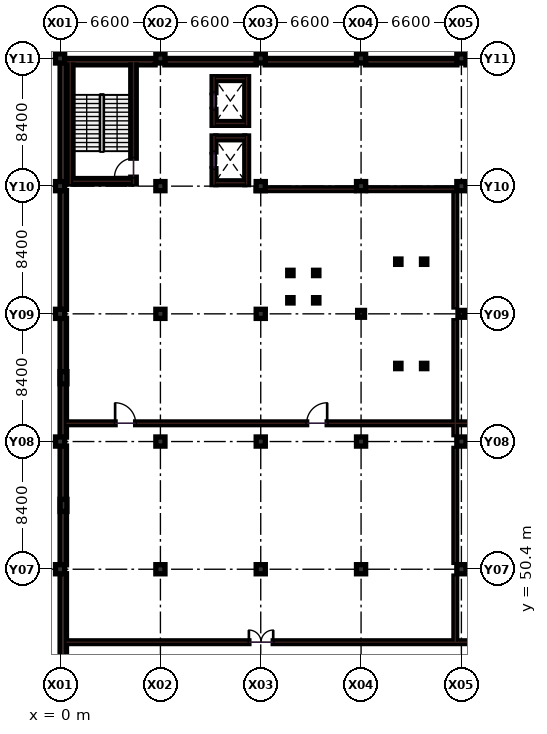
"""IFC4 building model, lengths in metres.
Left out: names, types, materials, properties, quantities, classifications, styles, units other than length and angle.
Written with IfcOpenShell. Run it as: python <this file> out.ifc"""

import sys

from ifc_helpers import new_model, si_unit, direction, frame, frame_2d, origin, origin_2d, place, context, subcontext, project, spatial, rectangle, extrude, element, fill, save


model = new_model("IFC4")
c1 = context("Model", 3, precision=1e-05, world=origin(), true_north=direction((0.0, 1.0)))
c2 = subcontext(c1, "Body", "Model", "MODEL_VIEW")
j1 = project(units=[si_unit("LENGTHUNIT", "METRE"), si_unit("PLANEANGLEUNIT", "RADIAN")], contexts=[c1])
p1 = place(None, origin())
s1 = spatial("IfcSite", under=j1, at=p1, CompositionType="ELEMENT")
p2 = place(p1, origin())
s2 = spatial("IfcBuilding", under=s1, at=p2, CompositionType="ELEMENT")
p3 = place(p2, frame((0.0, 0.0, -4.5)))
s3 = spatial("IfcBuildingStorey", under=s2, at=p3, CompositionType="ELEMENT", Elevation=-4.5)
for number, where, z_axis, x_axis in (
    (1, (0.0, 50.4, 0.0), (0.0, 0.0, 1.0), (1.0, 0.0, 0.0)),
    (2, (0.0, 58.8, 0.0), (0.0, 0.0, 1.0), (1.0, 0.0, 0.0)),
    (3, (0.0, 67.2, 0.0), (0.0, 0.0, 1.0), (1.0, 0.0, 0.0)),
    (4, (0.0, 75.6, 0.0), (0.0, 0.0, 1.0), (1.0, 0.0, 0.0)),
    (5, (0.0, 84.0, 0.0), (0.0, 0.0, 1.0), (1.0, 0.0, 0.0)),
    (6, (6.6, 50.4, 0.0), (0.0, 0.0, 1.0), (1.0, 0.0, 0.0)),
    (7, (6.6, 58.8, 0.0), (0.0, 0.0, 1.0), (1.0, 0.0, 0.0)),
    (8, (6.6, 67.2, 0.0), (0.0, 0.0, 1.0), (1.0, 0.0, 0.0)),
    (9, (6.6, 75.6, 0.0), (0.0, 0.0, 1.0), (1.0, 0.0, 0.0)),
    (10, (6.6, 84.0, 0.0), (0.0, 0.0, 1.0), (1.0, 0.0, 0.0)),
    (11, (13.2, 50.4, 0.0), (0.0, 0.0, 1.0), (1.0, 0.0, 0.0)),
    (12, (13.2, 58.8, 0.0), (0.0, 0.0, 1.0), (1.0, 0.0, 0.0)),
    (13, (13.2, 67.2, 0.0), (0.0, 0.0, 1.0), (1.0, 0.0, 0.0)),
    (14, (13.2, 75.6, 0.0), (0.0, 0.0, 1.0), (1.0, 0.0, 0.0)),
    (15, (13.2, 84.0, 0.0), (0.0, 0.0, 1.0), (1.0, 0.0, 0.0)),
    (16, (19.8, 50.4, 0.0), (0.0, 0.0, 1.0), (1.0, 0.0, 0.0)),
    (17, (19.8, 58.8, 0.0), (0.0, 0.0, 1.0), (1.0, 0.0, 0.0)),
):
    element("IfcColumn", number, at=place(p3, frame(where, z_axis=z_axis, x_axis=x_axis)), inside=s3, PredefinedType="COLUMN", context=c2, shape_type="SweptSolid", body=[
        extrude(rectangle(XDim=0.6, YDim=0.6, at=origin_2d()), origin(), (0.0, 0.0, 1.0), 4.5),
    ])
p4 = place(p3, frame((19.8, 67.2, 0.0), z_axis=(0.0, 0.0, 1.0), x_axis=(1.0, 0.0, 0.0)))
e18 = element("IfcColumn", 18, at=p4, inside=s3, PredefinedType="COLUMN", context=c2, shape_type="SweptSolid", body=[
    extrude(rectangle(XDim=0.45, YDim=0.45, at=origin_2d()), origin(), (0.0, 0.0, 1.0), 4.5),
])
for number, where, z_axis, x_axis in (
    (19, (19.8, 75.6, 0.0), (0.0, 0.0, 1.0), (1.0, 0.0, 0.0)),
    (20, (19.8, 84.0, 0.0), (0.0, 0.0, 1.0), (1.0, 0.0, 0.0)),
    (21, (26.4, 50.4, 0.0), (0.0, 0.0, 1.0), (1.0, 0.0, 0.0)),
    (22, (26.4, 58.8, 0.0), (0.0, 0.0, 1.0), (1.0, 0.0, 0.0)),
):
    element("IfcColumn", number, at=place(p3, frame(where, z_axis=z_axis, x_axis=x_axis)), inside=s3, PredefinedType="COLUMN", context=c2, shape_type="SweptSolid", body=[
        extrude(rectangle(XDim=0.6, YDim=0.6, at=origin_2d()), origin(), (0.0, 0.0, 1.0), 4.5),
    ])
p5 = place(p3, frame((26.4, 67.2, 0.0), z_axis=(0.0, 0.0, 1.0), x_axis=(1.0, 0.0, 0.0)))
e23 = element("IfcColumn", 23, at=p5, inside=s3, PredefinedType="COLUMN", context=c2, shape_type="SweptSolid", body=[
    extrude(rectangle(XDim=0.45, YDim=0.45, at=origin_2d()), origin(), (0.0, 0.0, 1.0), 4.5),
])
for number, where, z_axis, x_axis in (
    (24, (26.4, 75.6, 0.0), (0.0, 0.0, 1.0), (1.0, 0.0, 0.0)),
    (25, (26.4, 84.0, 0.0), (0.0, 0.0, 1.0), (1.0, 0.0, 0.0)),
):
    element("IfcColumn", number, at=place(p3, frame(where, z_axis=z_axis, x_axis=x_axis)), inside=s3, PredefinedType="COLUMN", context=c2, shape_type="SweptSolid", body=[
        extrude(rectangle(XDim=0.6, YDim=0.6, at=origin_2d()), origin(), (0.0, 0.0, 1.0), 4.5),
    ])
for number, where, z_axis, x_axis in (
    (26, (0.225, 54.6, 0.0), (0.0, 0.0, 1.0), (1.0, 0.0, 0.0)),
    (27, (0.225, 63.0, 0.0), (0.0, 0.0, 1.0), (1.0, 0.0, 0.0)),
):
    element("IfcColumn", number, at=place(p3, frame(where, z_axis=z_axis, x_axis=x_axis)), inside=s3, PredefinedType="PILASTER", context=c2, shape_type="SweptSolid", body=[
        extrude(rectangle(XDim=0.45, YDim=0.8, at=origin_2d()), origin(), (0.0, 0.0, 1.0), 4.5),
    ])
p6 = place(p3, frame((0.42, 45.6, 0.0), z_axis=(0.0, 0.0, 1.0), x_axis=(1.0, 0.0, 0.0)))
e28 = element("IfcWall", 28, at=p6, inside=s3, PredefinedType="SOLIDWALL", context=c2, shape_type="SweptSolid", body=[
    extrude(rectangle(XDim=45.36, YDim=0.18, at=frame_2d((22.68, 0.0))), origin(), (0.0, 0.0, 1.0), 3.29),
])
p7 = place(p6, frame((12.0, 0.0, 0.0)))
e29 = element("IfcOpeningElement", 29, at=p7, cuts=e28, PredefinedType="OPENING", context=c2, shape_type="SweptSolid", body=[
    extrude(rectangle(XDim=1.6, YDim=2.2, at=frame_2d((0.8, 1.1))), frame((0.0, 0.1, 0.0), z_axis=(0.0, -1.0, 0.0), x_axis=(1.0, 0.0, 0.0)), (0.0, 0.0, 1.0), 0.2),
])
p8 = place(p6, frame((34.0, 0.0, 0.0)))
e30 = element("IfcOpeningElement", 30, at=p8, cuts=e28, PredefinedType="OPENING", context=c2, shape_type="SweptSolid", body=[
    extrude(rectangle(XDim=1.6, YDim=2.2, at=frame_2d((0.8, 1.1))), frame((0.0, 0.1, 0.0), z_axis=(0.0, -1.0, 0.0), x_axis=(1.0, 0.0, 0.0)), (0.0, 0.0, 1.0), 0.2),
])
p9 = place(p3, frame((26.0, 45.6, 0.0), z_axis=(0.0, 0.0, 1.0), x_axis=(0.0, 1.0, 0.0)))
e31 = element("IfcWall", 31, at=p9, inside=s3, PredefinedType="SOLIDWALL", context=c2, shape_type="SweptSolid", body=[
    extrude(rectangle(XDim=4.35, YDim=0.18, at=frame_2d((2.175, 0.0))), origin(), (0.0, 0.0, 1.0), 3.29),
])
for number, where, z_axis, x_axis in (
    (32, (26.0, 50.85, 0.0), (0.0, 0.0, 1.0), (0.0, 1.0, 0.0)),
    (33, (26.0, 59.25, 0.0), (0.0, 0.0, 1.0), (0.0, 1.0, 0.0)),
):
    element("IfcWall", number, at=place(p3, frame(where, z_axis=z_axis, x_axis=x_axis)), inside=s3, PredefinedType="SOLIDWALL", context=c2, shape_type="SweptSolid", body=[
        extrude(rectangle(XDim=7.5, YDim=0.18, at=frame_2d((3.75, 0.0))), origin(), (0.0, 0.0, 1.0), 3.29),
    ])
p10 = place(p3, frame((26.0, 67.65, 0.0), z_axis=(0.0, 0.0, 1.0), x_axis=(0.0, 1.0, 0.0)))
e34 = element("IfcWall", 34, at=p10, inside=s3, PredefinedType="SOLIDWALL", context=c2, shape_type="SweptSolid", body=[
    extrude(rectangle(XDim=7.75, YDim=0.18, at=frame_2d((3.875, 0.0))), origin(), (0.0, 0.0, 1.0), 3.29),
])
p11 = place(p3, frame((12.9, 75.4, 0.0), z_axis=(0.0, 0.0, 1.0), x_axis=(1.0, 0.0, 0.0)))
e35 = element("IfcWall", 35, at=p11, inside=s3, PredefinedType="SOLIDWALL", context=c2, shape_type="SweptSolid", body=[
    extrude(rectangle(XDim=6.45, YDim=0.18, at=frame_2d((3.225, 0.0))), origin(), (0.0, 0.0, 1.0), 3.275),
])
p12 = place(p3, frame((20.25, 75.4, 0.0), z_axis=(0.0, 0.0, 1.0), x_axis=(1.0, 0.0, 0.0)))
e36 = element("IfcWall", 36, at=p12, inside=s3, PredefinedType="SOLIDWALL", context=c2, shape_type="SweptSolid", body=[
    extrude(rectangle(XDim=5.7, YDim=0.18, at=frame_2d((2.85, 0.0))), origin(), (0.0, 0.0, 1.0), 3.275),
])
p13 = place(p3, frame((0.42, 60.0, 0.0), z_axis=(0.0, 0.0, 1.0), x_axis=(1.0, 0.0, 0.0)))
e37 = element("IfcWall", 37, at=p13, inside=s3, PredefinedType="SOLIDWALL", context=c2, shape_type="SweptSolid", body=[
    extrude(rectangle(XDim=25.58, YDim=0.18, at=frame_2d((12.79, 0.0))), origin(), (0.0, 0.0, 1.0), 3.29),
])
p14 = place(p13, frame((3.2, 0.0, 0.0)))
e38 = element("IfcOpeningElement", 38, at=p14, cuts=e37, PredefinedType="OPENING", context=c2, shape_type="SweptSolid", body=[
    extrude(rectangle(XDim=1.35, YDim=2.2, at=frame_2d((0.675, 1.1))), frame((0.0, 0.1, 0.0), z_axis=(0.0, -1.0, 0.0), x_axis=(1.0, 0.0, 0.0)), (0.0, 0.0, 1.0), 0.2),
])
p15 = place(p13, frame((15.8, 0.0, 0.0)))
e39 = element("IfcOpeningElement", 39, at=p15, cuts=e37, PredefinedType="OPENING", context=c2, shape_type="SweptSolid", body=[
    extrude(rectangle(XDim=1.35, YDim=2.2, at=frame_2d((0.675, 1.1))), frame((0.0, 0.1, 0.0), z_axis=(0.0, -1.0, 0.0), x_axis=(1.0, 0.0, 0.0)), (0.0, 0.0, 1.0), 0.2),
])
p16 = place(p3, frame((26.0, 60.0, 0.0), z_axis=(0.0, 0.0, 1.0), x_axis=(1.0, 0.0, 0.0)))
e40 = element("IfcWall", 40, at=p16, inside=s3, PredefinedType="SOLIDWALL", context=c2, shape_type="SweptSolid", body=[
    extrude(rectangle(XDim=19.85, YDim=0.18, at=frame_2d((9.925, 0.0))), origin(), (0.0, 0.0, 1.0), 3.29),
])
p17 = place(p16, frame((3.2, 0.0, 0.0)))
e41 = element("IfcOpeningElement", 41, at=p17, cuts=e40, PredefinedType="OPENING", context=c2, shape_type="SweptSolid", body=[
    extrude(rectangle(XDim=1.75, YDim=2.3, at=frame_2d((0.875, 1.15))), frame((0.0, 0.1, 0.0), z_axis=(0.0, -1.0, 0.0), x_axis=(1.0, 0.0, 0.0)), (0.0, 0.0, 1.0), 0.2),
])
p18 = place(p16, frame((10.2, 0.0, 0.0)))
e42 = element("IfcOpeningElement", 42, at=p18, cuts=e40, PredefinedType="OPENING", context=c2, shape_type="SweptSolid", body=[
    extrude(rectangle(XDim=1.75, YDim=2.3, at=frame_2d((0.875, 1.15))), frame((0.0, 0.1, 0.0), z_axis=(0.0, -1.0, 0.0), x_axis=(1.0, 0.0, 0.0)), (0.0, 0.0, 1.0), 0.2),
])
p19 = place(p3, frame((0.21, 50.105, 0.0), z_axis=(0.0, 0.0, 1.0), x_axis=(0.0, -1.0, 0.0)))
e43 = element("IfcWall", 43, at=p19, inside=s3, PredefinedType="SOLIDWALL", context=c2, shape_type="SweptSolid", body=[
    extrude(rectangle(XDim=7.81, YDim=0.42, at=frame_2d((3.905, 0.0))), origin(), (0.0, 0.0, 1.0), 4.14),
])
p20 = place(p3, frame((0.21, 58.505, 0.0), z_axis=(0.0, 0.0, 1.0), x_axis=(0.0, -1.0, 0.0)))
e44 = element("IfcWall", 44, at=p20, inside=s3, PredefinedType="SOLIDWALL", context=c2, shape_type="SweptSolid", body=[
    extrude(rectangle(XDim=7.81, YDim=0.42, at=frame_2d((3.905, 0.0))), origin(), (0.0, 0.0, 1.0), 4.14),
])
p21 = place(p3, frame((0.21, 66.905, 0.0), z_axis=(0.0, 0.0, 1.0), x_axis=(0.0, -1.0, 0.0)))
e45 = element("IfcWall", 45, at=p21, inside=s3, PredefinedType="SOLIDWALL", context=c2, shape_type="SweptSolid", body=[
    extrude(rectangle(XDim=7.81, YDim=0.42, at=frame_2d((3.905, 0.0))), origin(), (0.0, 0.0, 1.0), 4.14),
])
p22 = place(p3, frame((0.21, 75.305, 0.0), z_axis=(0.0, 0.0, 1.0), x_axis=(0.0, -1.0, 0.0)))
e46 = element("IfcWall", 46, at=p22, inside=s3, PredefinedType="SOLIDWALL", context=c2, shape_type="SweptSolid", body=[
    extrude(rectangle(XDim=7.81, YDim=0.42, at=frame_2d((3.905, 0.0))), origin(), (0.0, 0.0, 1.0), 4.14),
])
p23 = place(p3, frame((6.25, 83.79, 0.0), z_axis=(0.0, 0.0, 1.0), x_axis=(-1.0, 0.0, 0.0)))
e47 = element("IfcWall", 47, at=p23, inside=s3, PredefinedType="SOLIDWALL", context=c2, shape_type="SweptSolid", body=[
    extrude(rectangle(XDim=5.9, YDim=0.42, at=frame_2d((2.95, 0.0))), origin(), (0.0, 0.0, 1.0), 4.14),
])
p24 = place(p3, frame((0.21, 83.705, 0.0), z_axis=(0.0, 0.0, 1.0), x_axis=(0.0, -1.0, 0.0)))
e48 = element("IfcWall", 48, at=p24, inside=s3, PredefinedType="SOLIDWALL", context=c2, shape_type="SweptSolid", body=[
    extrude(rectangle(XDim=7.81, YDim=0.42, at=frame_2d((3.905, 0.0))), origin(), (0.0, 0.0, 1.0), 4.14),
])
p25 = place(p3, frame((12.905, 83.79, 0.0), z_axis=(0.0, 0.0, 1.0), x_axis=(-1.0, 0.0, 0.0)))
e49 = element("IfcWall", 49, at=p25, inside=s3, PredefinedType="SOLIDWALL", context=c2, shape_type="SweptSolid", body=[
    extrude(rectangle(XDim=6.01, YDim=0.42, at=frame_2d((3.005, 0.0))), origin(), (0.0, 0.0, 1.0), 4.14),
])
p26 = place(p3, frame((19.505, 83.79, 0.0), z_axis=(0.0, 0.0, 1.0), x_axis=(-1.0, 0.0, 0.0)))
e50 = element("IfcWall", 50, at=p26, inside=s3, PredefinedType="SOLIDWALL", context=c2, shape_type="SweptSolid", body=[
    extrude(rectangle(XDim=6.01, YDim=0.42, at=frame_2d((3.005, 0.0))), origin(), (0.0, 0.0, 1.0), 4.14),
])
for number, where, z_axis, x_axis in (
    (51, (26.105, 83.79, 0.0), (0.0, 0.0, 1.0), (-1.0, 0.0, 0.0)),
    (52, (32.705, 83.79, 0.0), (0.0, 0.0, 1.0), (-1.0, 0.0, 0.0)),
):
    element("IfcWall", number, at=place(p3, frame(where, z_axis=z_axis, x_axis=x_axis)), inside=s3, PredefinedType="SOLIDWALL", context=c2, shape_type="SweptSolid", body=[
        extrude(rectangle(XDim=6.01, YDim=0.42, at=frame_2d((3.005, 0.0))), origin(), (0.0, 0.0, 1.0), 4.14),
    ])
p27 = place(p3, frame((0.67, 75.74, 0.0), z_axis=(0.0, 0.0, 1.0), x_axis=(0.0, 1.0, 0.0)))
e53 = element("IfcWall", 53, at=p27, inside=s3, PredefinedType="SHEAR", context=c2, shape_type="SweptSolid", body=[
    extrude(rectangle(XDim=8.05, YDim=0.36, at=frame_2d((4.025, 0.0))), origin(), (0.0, 0.0, 1.0), 4.14),
])
p28 = place(p3, frame((4.83, 75.74, 0.0), z_axis=(0.0, 0.0, 1.0), x_axis=(0.0, 1.0, 0.0)))
e54 = element("IfcWall", 54, at=p28, inside=s3, PredefinedType="SHEAR", context=c2, shape_type="SweptSolid", body=[
    extrude(rectangle(XDim=8.05, YDim=0.36, at=frame_2d((4.025, 0.0))), origin(), (0.0, 0.0, 1.0), 4.14),
])
p29 = place(p28, frame((0.45, 0.0, 0.0)))
e55 = element("IfcOpeningElement", 55, at=p29, cuts=e54, PredefinedType="OPENING", context=c2, shape_type="SweptSolid", body=[
    extrude(rectangle(XDim=1.25, YDim=2.15, at=frame_2d((0.625, 1.075))), frame((0.0, 0.19, 0.0), z_axis=(0.0, -1.0, 0.0), x_axis=(1.0, 0.0, 0.0)), (0.0, 0.0, 1.0), 0.38),
])
p30 = place(p3, frame((0.85, 75.92, 0.0), z_axis=(0.0, 0.0, 1.0), x_axis=(1.0, 0.0, 0.0)))
e56 = element("IfcWall", 56, at=p30, inside=s3, PredefinedType="SHEAR", context=c2, shape_type="SweptSolid", body=[
    extrude(rectangle(XDim=3.8, YDim=0.36, at=frame_2d((1.9, 0.0))), origin(), (0.0, 0.0, 1.0), 4.14),
])
for number, where, z_axis, x_axis in (
    (57, (15.15, 68.09, 0.0), (0.0, 0.0, 1.0), (1.0, 0.0, 0.0)),
    (58, (16.85, 68.09, 0.0), (0.0, 0.0, 1.0), (1.0, 0.0, 0.0)),
    (59, (16.85, 69.89, 0.0), (0.0, 0.0, 1.0), (1.0, 0.0, 0.0)),
    (60, (15.15, 69.89, 0.0), (0.0, 0.0, 1.0), (1.0, 0.0, 0.0)),
    (61, (22.25, 63.77, 0.0), (0.0, 0.0, 1.0), (1.0, 0.0, 0.0)),
    (62, (23.95, 63.77, 0.0), (0.0, 0.0, 1.0), (1.0, 0.0, 0.0)),
    (63, (23.95, 70.63, 0.0), (0.0, 0.0, 1.0), (1.0, 0.0, 0.0)),
    (64, (22.25, 70.63, 0.0), (0.0, 0.0, 1.0), (1.0, 0.0, 0.0)),
):
    element("IfcColumn", number, at=place(p3, frame(where, z_axis=z_axis, x_axis=x_axis)), inside=s3, PredefinedType="COLUMN", context=c2, shape_type="SweptSolid", body=[
        extrude(rectangle(XDim=0.35, YDim=0.35, at=origin_2d()), origin(), (0.0, 0.0, 1.0), 4.5),
    ])
p31 = place(p3, frame((10.125, 75.7, 0.0), z_axis=(0.0, 0.0, 1.0), x_axis=(0.0, 1.0, 0.0)))
e65 = element("IfcWall", 65, at=p31, inside=s3, PredefinedType="SHEAR", context=c2, shape_type="SweptSolid", body=[
    extrude(rectangle(XDim=3.2, YDim=0.25, at=frame_2d((1.6, 0.0))), origin(), (0.0, 0.0, 1.0), 4.14),
])
p32 = place(p31, frame((1.05, 0.0, 0.0)))
e66 = element("IfcOpeningElement", 66, at=p32, cuts=e65, PredefinedType="OPENING", context=c2, shape_type="SweptSolid", body=[
    extrude(rectangle(XDim=1.1, YDim=2.15, at=frame_2d((0.55, 1.075))), frame((0.0, 0.135, 0.0), z_axis=(0.0, -1.0, 0.0), x_axis=(1.0, 0.0, 0.0)), (0.0, 0.0, 1.0), 0.27),
])
p33 = place(p3, frame((12.275, 75.7, 0.0), z_axis=(0.0, 0.0, 1.0), x_axis=(0.0, 1.0, 0.0)))
e67 = element("IfcWall", 67, at=p33, inside=s3, PredefinedType="SHEAR", context=c2, shape_type="SweptSolid", body=[
    extrude(rectangle(XDim=3.2, YDim=0.25, at=frame_2d((1.6, 0.0))), origin(), (0.0, 0.0, 1.0), 4.14),
])
for number, where, z_axis, x_axis in (
    (68, (10.25, 75.825, 0.0), (0.0, 0.0, 1.0), (1.0, 0.0, 0.0)),
    (69, (10.25, 78.775, 0.0), (0.0, 0.0, 1.0), (1.0, 0.0, 0.0)),
):
    element("IfcWall", number, at=place(p3, frame(where, z_axis=z_axis, x_axis=x_axis)), inside=s3, PredefinedType="SHEAR", context=c2, shape_type="SweptSolid", body=[
        extrude(rectangle(XDim=1.9, YDim=0.25, at=frame_2d((0.95, 0.0))), origin(), (0.0, 0.0, 1.0), 4.14),
    ])
p34 = place(p3, frame((10.125, 79.6, 0.0), z_axis=(0.0, 0.0, 1.0), x_axis=(0.0, 1.0, 0.0)))
e70 = element("IfcWall", 70, at=p34, inside=s3, PredefinedType="SHEAR", context=c2, shape_type="SweptSolid", body=[
    extrude(rectangle(XDim=3.2, YDim=0.25, at=frame_2d((1.6, 0.0))), origin(), (0.0, 0.0, 1.0), 4.14),
])
p35 = place(p34, frame((1.05, 0.0, 0.0)))
e71 = element("IfcOpeningElement", 71, at=p35, cuts=e70, PredefinedType="OPENING", context=c2, shape_type="SweptSolid", body=[
    extrude(rectangle(XDim=1.1, YDim=2.15, at=frame_2d((0.55, 1.075))), frame((0.0, 0.135, 0.0), z_axis=(0.0, -1.0, 0.0), x_axis=(1.0, 0.0, 0.0)), (0.0, 0.0, 1.0), 0.27),
])
p36 = place(p3, frame((12.275, 79.6, 0.0), z_axis=(0.0, 0.0, 1.0), x_axis=(0.0, 1.0, 0.0)))
e72 = element("IfcWall", 72, at=p36, inside=s3, PredefinedType="SHEAR", context=c2, shape_type="SweptSolid", body=[
    extrude(rectangle(XDim=3.2, YDim=0.25, at=frame_2d((1.6, 0.0))), origin(), (0.0, 0.0, 1.0), 4.14),
])
for number, where, z_axis, x_axis in (
    (73, (10.25, 79.725, 0.0), (0.0, 0.0, 1.0), (1.0, 0.0, 0.0)),
    (74, (10.25, 82.675, 0.0), (0.0, 0.0, 1.0), (1.0, 0.0, 0.0)),
):
    element("IfcWall", number, at=place(p3, frame(where, z_axis=z_axis, x_axis=x_axis)), inside=s3, PredefinedType="SHEAR", context=c2, shape_type="SweptSolid", body=[
        extrude(rectangle(XDim=1.9, YDim=0.25, at=frame_2d((0.95, 0.0))), origin(), (0.0, 0.0, 1.0), 4.14),
    ])
p37 = place(p7, origin())
e75 = element("IfcDoor", 75, at=p37, inside=s3, OperationType="DOUBLE_DOOR_SINGLE_SWING", PredefinedType="DOOR", context=c2, shape_type="SweptSolid", body=[
    extrude(rectangle(XDim=1.6, YDim=2.2, at=frame_2d((0.8, 1.1))), frame((0.0, 0.025, 0.0), z_axis=(0.0, -1.0, 0.0), x_axis=(1.0, 0.0, 0.0)), (0.0, 0.0, 1.0), 0.05),
])
fill(e29, e75)
p38 = place(p14, origin())
e76 = element("IfcDoor", 76, at=p38, inside=s3, OperationType="SINGLE_SWING_LEFT", PredefinedType="DOOR", context=c2, shape_type="SweptSolid", body=[
    extrude(rectangle(XDim=1.35, YDim=2.2, at=frame_2d((0.675, 1.1))), frame((0.0, 0.025, 0.0), z_axis=(0.0, -1.0, 0.0), x_axis=(1.0, 0.0, 0.0)), (0.0, 0.0, 1.0), 0.05),
])
fill(e38, e76)
p39 = place(p15, origin())
e77 = element("IfcDoor", 77, at=p39, inside=s3, OperationType="SINGLE_SWING_RIGHT", PredefinedType="DOOR", context=c2, shape_type="SweptSolid", body=[
    extrude(rectangle(XDim=1.35, YDim=2.2, at=frame_2d((0.675, 1.1))), frame((0.0, 0.025, 0.0), z_axis=(0.0, -1.0, 0.0), x_axis=(1.0, 0.0, 0.0)), (0.0, 0.0, 1.0), 0.05),
])
fill(e39, e77)
p40 = place(p29, origin())
e78 = element("IfcDoor", 78, at=p40, inside=s3, OperationType="SINGLE_SWING_LEFT", PredefinedType="DOOR", context=c2, shape_type="SweptSolid", body=[
    extrude(rectangle(XDim=1.25, YDim=2.15, at=frame_2d((0.625, 1.075))), frame((0.0, 0.025, 0.0), z_axis=(0.0, -1.0, 0.0), x_axis=(1.0, 0.0, 0.0)), (0.0, 0.0, 1.0), 0.05),
])
fill(e55, e78)
p41 = place(p32, origin())
e79 = element("IfcDoor", 79, at=p41, inside=s3, OperationType="SLIDING_TO_LEFT", PredefinedType="DOOR", context=c2, shape_type="SweptSolid", body=[
    extrude(rectangle(XDim=1.1, YDim=2.15, at=frame_2d((0.55, 1.075))), frame((0.0, 0.025, 0.0), z_axis=(0.0, -1.0, 0.0), x_axis=(1.0, 0.0, 0.0)), (0.0, 0.0, 1.0), 0.05),
])
fill(e66, e79)
p42 = place(p35, origin())
e80 = element("IfcDoor", 80, at=p42, inside=s3, OperationType="SLIDING_TO_LEFT", PredefinedType="DOOR", context=c2, shape_type="SweptSolid", body=[
    extrude(rectangle(XDim=1.1, YDim=2.15, at=frame_2d((0.55, 1.075))), frame((0.0, 0.025, 0.0), z_axis=(0.0, -1.0, 0.0), x_axis=(1.0, 0.0, 0.0)), (0.0, 0.0, 1.0), 0.05),
])
fill(e71, e80)
save(model, sys.argv[1])
